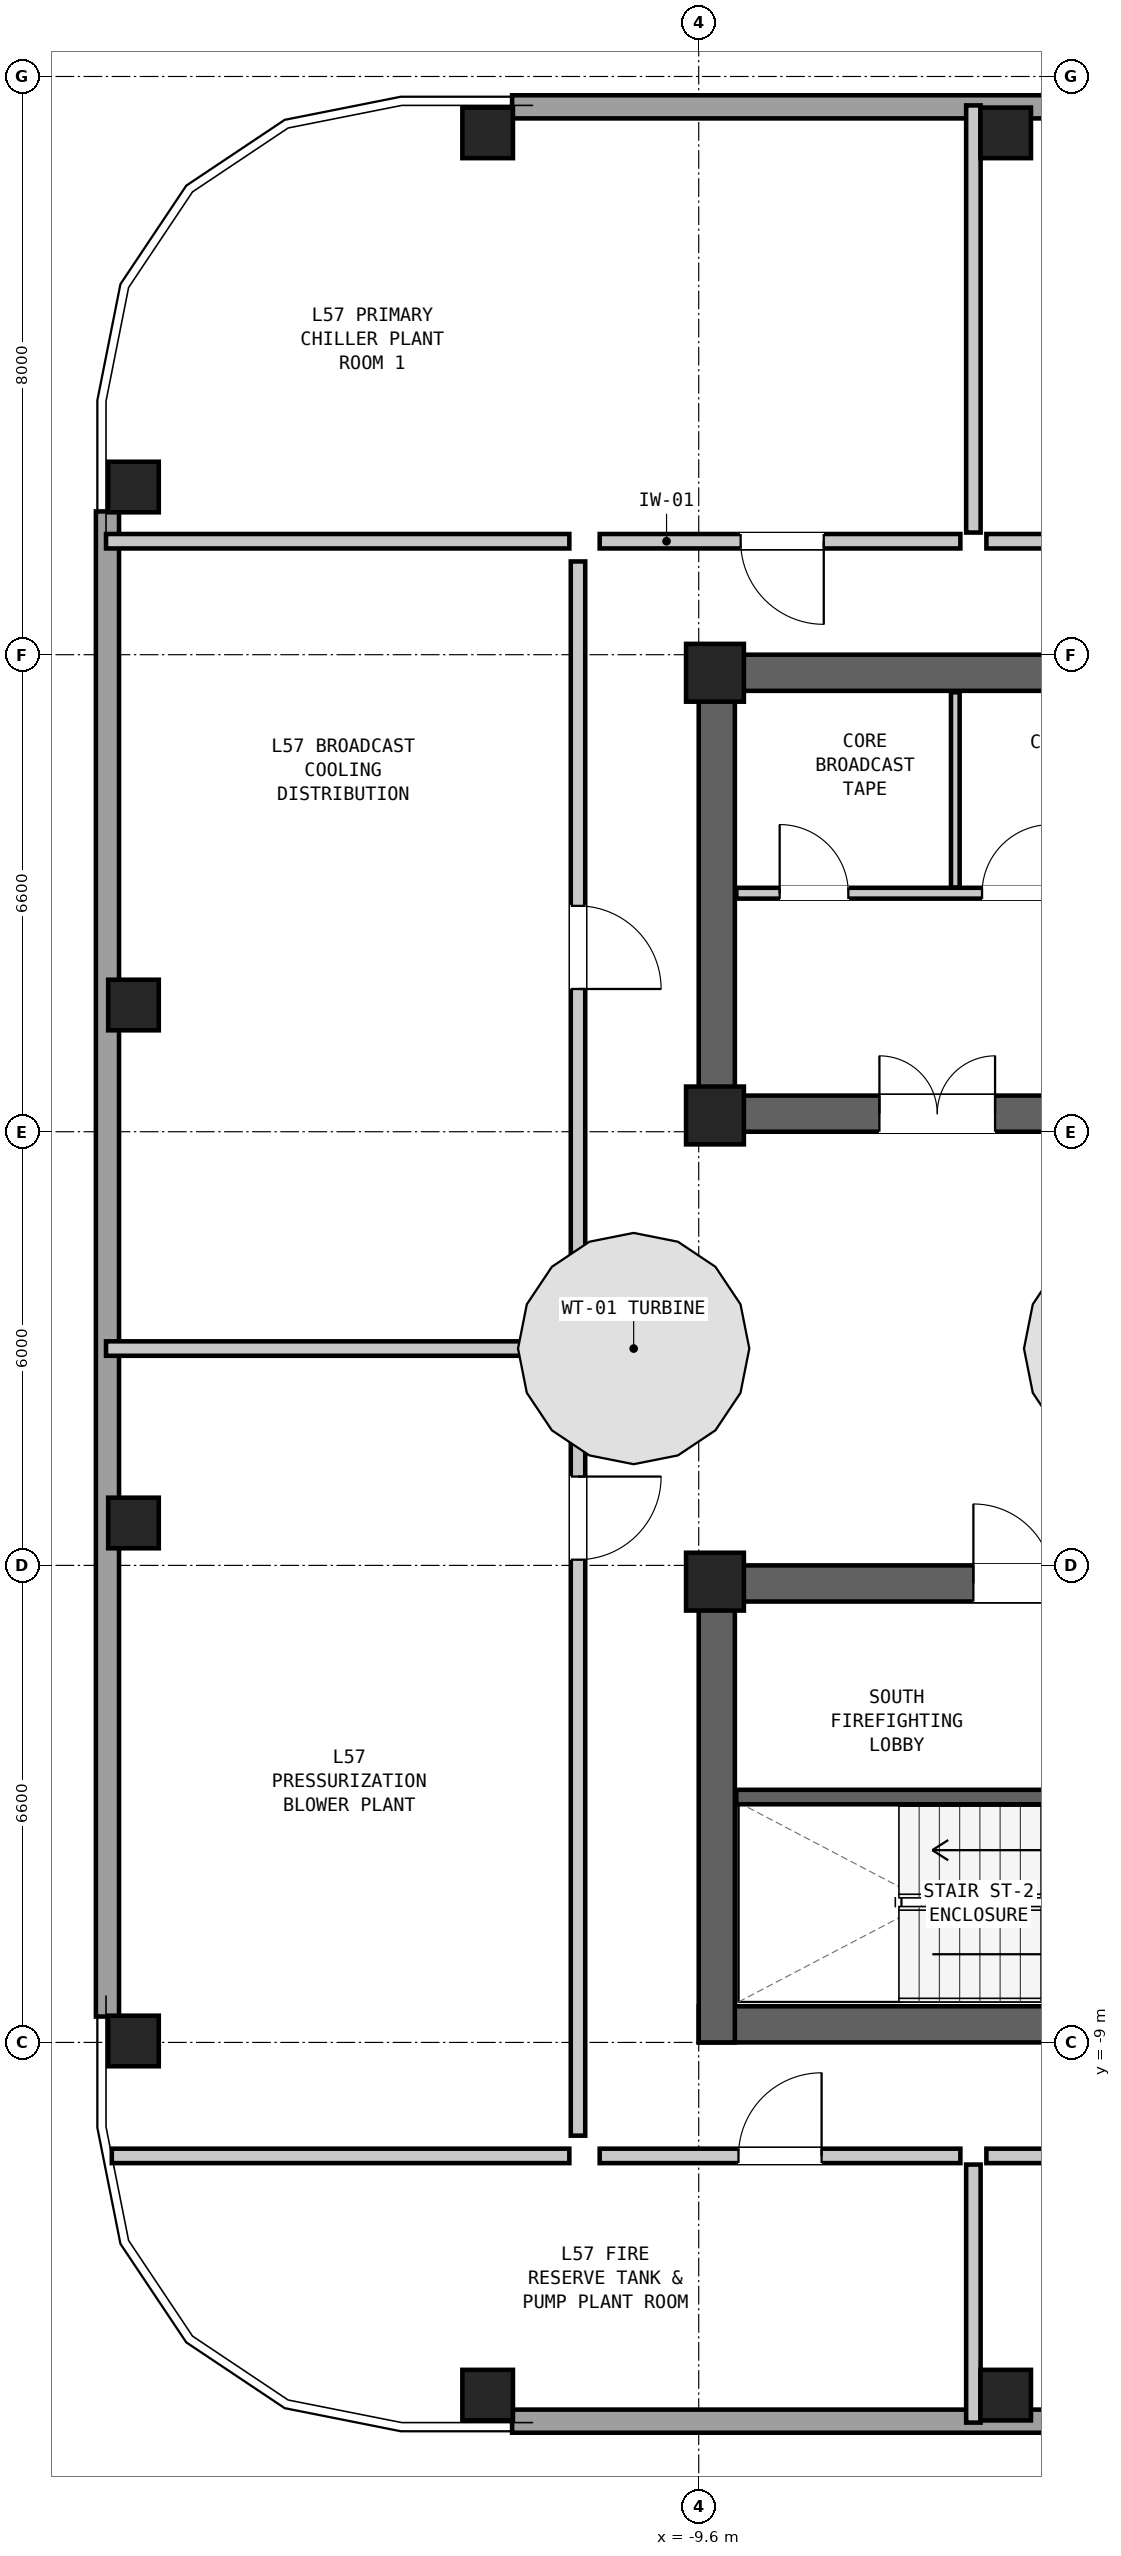
"""IFC4 building model, lengths in metres.
Left out: names, types, materials, properties, quantities, classifications, styles, units other than length and angle.
Written with IfcOpenShell. Run it as: python <this file> out.ifc"""

import sys

from ifc_helpers import new_model, si_unit, direction, frame, frame_2d, origin, origin_2d, place, context, subcontext, project, spatial, rectangle, hollow_rectangle, extrude, element, fill, save


model = new_model("IFC4")
c1 = context("Model", 3, precision=1e-05, world=origin(), true_north=direction((0.0, 1.0)))
c2 = subcontext(c1, "Body", "Model", "MODEL_VIEW")
j1 = project(units=[si_unit("LENGTHUNIT", "METRE"), si_unit("PLANEANGLEUNIT", "RADIAN")], contexts=[c1])
p1 = place(None, origin())
s1 = spatial("IfcSite", under=j1, at=p1, CompositionType="ELEMENT")
p2 = place(p1, origin())
s2 = spatial("IfcBuilding", under=s1, at=p2, CompositionType="ELEMENT")
p3 = place(p2, frame((0.0, 0.0, 195.15)))
s3 = spatial("IfcBuildingStorey", under=s2, at=p3, CompositionType="ELEMENT", Elevation=195.15)
p4 = place(p3, frame((-9.6, 9.95, 0.0), z_axis=(0.0, 0.0, 1.0), x_axis=(1.0, 0.0, 0.0)))
e1 = element("IfcWall", 1, at=p4, inside=s3, PredefinedType="SHEAR", context=c2, shape_type="SweptSolid", body=[
    extrude(rectangle(XDim=19.2, YDim=0.5, at=frame_2d((9.6, 0.0))), origin(), (0.0, 0.0, 1.0), 4.35),
])
p5 = place(p3, frame((-9.6, 3.85, 0.0), z_axis=(0.0, 0.0, 1.0), x_axis=(1.0, 0.0, 0.0)))
e2 = element("IfcWall", 2, at=p5, inside=s3, PredefinedType="SHEAR", context=c2, shape_type="SweptSolid", body=[
    extrude(rectangle(XDim=19.2, YDim=0.5, at=frame_2d((9.6, 0.0))), origin(), (0.0, 0.0, 1.0), 4.35),
])
p6 = place(p5, frame((14.2, 0.0, 0.0)))
e3 = element("IfcOpeningElement", 3, at=p6, cuts=e2, PredefinedType="OPENING", context=c2, shape_type="SweptSolid", body=[
    extrude(rectangle(XDim=1.1, YDim=2.08, at=frame_2d((0.55, 1.04))), frame((0.0, 0.262, 0.0), z_axis=(0.0, -1.0, 0.0), x_axis=(1.0, 0.0, 0.0)), (0.0, 0.0, 1.0), 0.524),
])
p7 = place(p5, frame((8.2, 0.0, 0.0)))
e4 = element("IfcOpeningElement", 4, at=p7, cuts=e2, PredefinedType="OPENING", context=c2, shape_type="SweptSolid", body=[
    extrude(rectangle(XDim=1.15, YDim=2.1, at=frame_2d((0.575, 1.05))), frame((0.0, 0.262, 0.0), z_axis=(0.0, -1.0, 0.0), x_axis=(1.0, 0.0, 0.0)), (0.0, 0.0, 1.0), 0.524),
])
p8 = place(p5, frame((2.5, 0.0, 0.0)))
e5 = element("IfcOpeningElement", 5, at=p8, cuts=e2, PredefinedType="OPENING", context=c2, shape_type="SweptSolid", body=[
    extrude(rectangle(XDim=1.6, YDim=2.12, at=frame_2d((0.8, 1.06))), frame((0.0, 0.262, 0.0), z_axis=(0.0, -1.0, 0.0), x_axis=(1.0, 0.0, 0.0)), (0.0, 0.0, 1.0), 0.524),
])
p9 = place(p3, frame((-9.35, 3.6, 0.0), z_axis=(0.0, 0.0, 1.0), x_axis=(0.0, 1.0, 0.0)))
e6 = element("IfcWall", 6, at=p9, inside=s3, PredefinedType="SHEAR", context=c2, shape_type="SweptSolid", body=[
    extrude(rectangle(XDim=6.6, YDim=0.5, at=frame_2d((3.3, 0.0))), origin(), (0.0, 0.0, 1.0), 4.35),
])
p10 = place(p3, frame((-9.6, -8.75, 0.0), z_axis=(0.0, 0.0, 1.0), x_axis=(1.0, 0.0, 0.0)))
e7 = element("IfcWall", 7, at=p10, inside=s3, PredefinedType="SHEAR", context=c2, shape_type="SweptSolid", body=[
    extrude(rectangle(XDim=19.2, YDim=0.5, at=frame_2d((9.6, 0.0))), origin(), (0.0, 0.0, 1.0), 4.35),
])
p11 = place(p3, frame((-9.6, -2.65, 0.0), z_axis=(0.0, 0.0, 1.0), x_axis=(1.0, 0.0, 0.0)))
e8 = element("IfcWall", 8, at=p11, inside=s3, PredefinedType="SHEAR", context=c2, shape_type="SweptSolid", body=[
    extrude(rectangle(XDim=19.2, YDim=0.5, at=frame_2d((9.6, 0.0))), origin(), (0.0, 0.0, 1.0), 4.35),
])
p12 = place(p11, frame((3.8, 0.0, 0.0)))
e9 = element("IfcOpeningElement", 9, at=p12, cuts=e8, PredefinedType="OPENING", context=c2, shape_type="SweptSolid", body=[
    extrude(rectangle(XDim=1.1, YDim=2.08, at=frame_2d((0.55, 1.04))), frame((0.0, 0.262, 0.0), z_axis=(0.0, -1.0, 0.0), x_axis=(1.0, 0.0, 0.0)), (0.0, 0.0, 1.0), 0.524),
])
p13 = place(p11, frame((10.15, 0.0, 0.0)))
e10 = element("IfcOpeningElement", 10, at=p13, cuts=e8, PredefinedType="OPENING", context=c2, shape_type="SweptSolid", body=[
    extrude(rectangle(XDim=0.9, YDim=2.05, at=frame_2d((0.45, 1.025))), frame((0.0, 0.262, 0.0), z_axis=(0.0, -1.0, 0.0), x_axis=(1.0, 0.0, 0.0)), (0.0, 0.0, 1.0), 0.524),
])
p14 = place(p11, frame((12.1, 0.0, 0.0)))
e11 = element("IfcOpeningElement", 11, at=p14, cuts=e8, PredefinedType="OPENING", context=c2, shape_type="SweptSolid", body=[
    extrude(rectangle(XDim=0.95, YDim=2.1, at=frame_2d((0.475, 1.05))), frame((0.0, 0.262, 0.0), z_axis=(0.0, -1.0, 0.0), x_axis=(1.0, 0.0, 0.0)), (0.0, 0.0, 1.0), 0.524),
])
p15 = place(p11, frame((14.8, 0.0, 0.0)))
e12 = element("IfcOpeningElement", 12, at=p15, cuts=e8, PredefinedType="OPENING", context=c2, shape_type="SweptSolid", body=[
    extrude(rectangle(XDim=1.6, YDim=2.12, at=frame_2d((0.8, 1.06))), frame((0.0, 0.262, 0.0), z_axis=(0.0, -1.0, 0.0), x_axis=(1.0, 0.0, 0.0)), (0.0, 0.0, 1.0), 0.524),
])
p16 = place(p3, frame((-9.35, -9.0, 0.0), z_axis=(0.0, 0.0, 1.0), x_axis=(0.0, 1.0, 0.0)))
e13 = element("IfcWall", 13, at=p16, inside=s3, PredefinedType="SHEAR", context=c2, shape_type="SweptSolid", body=[
    extrude(rectangle(XDim=6.6, YDim=0.5, at=frame_2d((3.3, 0.0))), origin(), (0.0, 0.0, 1.0), 4.35),
])
for number, where, z_axis, x_axis in (
    (14, (-12.52, -13.88, 0.0), (0.0, 0.0, 1.0), (1.0, 0.0, 0.0)),
    (15, (-5.353, -13.88, 0.0), (0.0, 0.0, 1.0), (1.0, 0.0, 0.0)),
    (16, (-5.353, 17.42, 0.0), (0.0, 0.0, 1.0), (1.0, 0.0, 0.0)),
    (17, (-12.52, 17.42, 0.0), (0.0, 0.0, 1.0), (1.0, 0.0, 0.0)),
    (18, (-17.42, 12.52, 0.0), (0.0, 0.0, 1.0), (0.0, 1.0, 0.0)),
    (19, (-17.42, 5.353, 0.0), (0.0, 0.0, 1.0), (0.0, 1.0, 0.0)),
    (20, (-17.42, -1.813, 0.0), (0.0, 0.0, 1.0), (0.0, 1.0, 0.0)),
    (21, (-17.42, -8.98, 0.0), (0.0, 0.0, 1.0), (0.0, 1.0, 0.0)),
):
    element("IfcColumn", number, at=place(p3, frame(where, z_axis=z_axis, x_axis=x_axis)), inside=s3, PredefinedType="COLUMN", context=c2, shape_type="SweptSolid", body=[
        extrude(hollow_rectangle(XDim=0.7, YDim=0.7, WallThickness=0.045, at=origin_2d()), origin(), (0.0, 0.0, 1.0), 4.35),
    ])
for number, where, z_axis, x_axis in (
    (22, (-9.375, 9.95, 0.0), (0.0, 0.0, 1.0), (1.0, 0.0, 0.0)),
    (23, (-9.375, 3.825, 0.0), (0.0, 0.0, 1.0), (1.0, 0.0, 0.0)),
    (24, (-9.375, -2.625, 0.0), (0.0, 0.0, 1.0), (1.0, 0.0, 0.0)),
):
    element("IfcColumn", number, at=place(p3, frame(where, z_axis=z_axis, x_axis=x_axis)), inside=s3, PredefinedType="COLUMN", context=c2, shape_type="SweptSolid", body=[
        extrude(rectangle(XDim=0.8, YDim=0.8, at=origin_2d()), origin(), (0.0, 0.0, 1.0), 4.35),
    ])
for number, where, z_axis, x_axis in (
    (25, (8.642, -14.24, 0.0), (0.0, 0.0, 1.0), (-1.0, 0.0, 0.0)),
    (26, (-12.182, 17.78, 0.0), (0.0, 0.0, 1.0), (1.0, 0.0, 0.0)),
    (27, (-17.78, -8.642, 0.0), (0.0, 0.0, 1.0), (0.0, 1.0, 0.0)),
):
    element("IfcWall", number, at=place(p3, frame(where, z_axis=z_axis, x_axis=x_axis)), inside=s3, PredefinedType="SOLIDWALL", context=c2, shape_type="SweptSolid", body=[
        extrude(rectangle(XDim=20.824, YDim=0.32, at=frame_2d((10.412, 0.0))), origin(), (0.0, 0.0, 1.0), 2.34),
    ])
p17 = place(p3, frame((-9.08, 6.9, 0.0), z_axis=(0.0, 0.0, 1.0), x_axis=(1.0, 0.0, 0.0)))
e28 = element("IfcWall", 28, at=p17, inside=s3, PredefinedType="PARTITIONING", context=c2, shape_type="SweptSolid", body=[
    extrude(rectangle(XDim=5.96, YDim=0.15, at=frame_2d((2.98, 0.0))), origin(), (0.0, 0.0, 1.0), 4.16),
])
p18 = place(p17, frame((0.6, 0.0, 0.0)))
e29 = element("IfcOpeningElement", 29, at=p18, cuts=e28, PredefinedType="OPENING", context=c2, shape_type="SweptSolid", body=[
    extrude(rectangle(XDim=0.95, YDim=2.1, at=frame_2d((0.475, 1.05))), frame((0.0, 0.087, 0.0), z_axis=(0.0, -1.0, 0.0), x_axis=(1.0, 0.0, 0.0)), (0.0, 0.0, 1.0), 0.174),
])
p19 = place(p17, frame((3.4, 0.0, 0.0)))
e30 = element("IfcOpeningElement", 30, at=p19, cuts=e28, PredefinedType="OPENING", context=c2, shape_type="SweptSolid", body=[
    extrude(rectangle(XDim=0.95, YDim=2.1, at=frame_2d((0.475, 1.05))), frame((0.0, 0.087, 0.0), z_axis=(0.0, -1.0, 0.0), x_axis=(1.0, 0.0, 0.0)), (0.0, 0.0, 1.0), 0.174),
])
p20 = place(p3, frame((-6.05, 6.98, 0.0), z_axis=(0.0, 0.0, 1.0), x_axis=(0.0, 1.0, 0.0)))
e31 = element("IfcWall", 31, at=p20, inside=s3, PredefinedType="PARTITIONING", context=c2, shape_type="SweptSolid", body=[
    extrude(rectangle(XDim=2.7, YDim=0.12, at=frame_2d((1.35, 0.0))), origin(), (0.0, 0.0, 1.0), 4.16),
])
p21 = place(p3, frame((-9.08, -5.605, 0.0), z_axis=(0.0, 0.0, 1.0), x_axis=(1.0, 0.0, 0.0)))
e32 = element("IfcWall", 32, at=p21, inside=s3, PredefinedType="SHEAR", context=c2, shape_type="SweptSolid", body=[
    extrude(rectangle(XDim=6.72, YDim=0.2, at=frame_2d((3.36, 0.0))), origin(), (0.0, 0.0, 1.0), 4.16),
])
p22 = place(p21, frame((5.45, 0.0, 0.0)))
e33 = element("IfcOpeningElement", 33, at=p22, cuts=e32, PredefinedType="OPENING", context=c2, shape_type="SweptSolid", body=[
    extrude(rectangle(XDim=1.05, YDim=2.08, at=frame_2d((0.525, 1.04))), frame((0.0, 0.112, 0.0), z_axis=(0.0, -1.0, 0.0), x_axis=(1.0, 0.0, 0.0)), (0.0, 0.0, 1.0), 0.224),
])
p23 = place(p3, frame((-5.98, 11.77, 0.0), z_axis=(0.0, 0.0, 1.0), x_axis=(-1.0, 0.0, 0.0)))
e34 = element("IfcWall", 34, at=p23, inside=s3, PredefinedType="PARTITIONING", context=c2, shape_type="SweptSolid", body=[
    extrude(rectangle(XDim=4.99, YDim=0.2, at=frame_2d((2.495, 0.0))), origin(), (0.0, 0.0, 1.0), 4.16),
])
p24 = place(p23, frame((1.89, 0.0, 0.0)))
e35 = element("IfcOpeningElement", 35, at=p24, cuts=e34, PredefinedType="OPENING", context=c2, shape_type="SweptSolid", body=[
    extrude(rectangle(XDim=1.15, YDim=2.1, at=frame_2d((0.575, 1.05))), frame((0.0, 0.112, 0.0), z_axis=(0.0, -1.0, 0.0), x_axis=(1.0, 0.0, 0.0)), (0.0, 0.0, 1.0), 0.224),
])
p25 = place(p3, frame((-5.8, 11.89, 0.0), z_axis=(0.0, 0.0, 1.0), x_axis=(0.0, 1.0, 0.0)))
e36 = element("IfcWall", 36, at=p25, inside=s3, PredefinedType="PARTITIONING", context=c2, shape_type="SweptSolid", body=[
    extrude(rectangle(XDim=5.91, YDim=0.2, at=frame_2d((2.955, 0.0))), origin(), (0.0, 0.0, 1.0), 3.681),
])
p26 = place(p3, frame((-0.53, 11.77, 0.0), z_axis=(0.0, 0.0, 1.0), x_axis=(-1.0, 0.0, 0.0)))
e37 = element("IfcWall", 37, at=p26, inside=s3, PredefinedType="PARTITIONING", context=c2, shape_type="SweptSolid", body=[
    extrude(rectangle(XDim=5.09, YDim=0.2, at=frame_2d((2.545, 0.0))), origin(), (0.0, 0.0, 1.0), 4.16),
])
p27 = place(p26, frame((1.97, 0.0, 0.0)))
e38 = element("IfcOpeningElement", 38, at=p27, cuts=e37, PredefinedType="OPENING", context=c2, shape_type="SweptSolid", body=[
    extrude(rectangle(XDim=1.15, YDim=2.1, at=frame_2d((0.575, 1.05))), frame((0.0, 0.112, 0.0), z_axis=(0.0, -1.0, 0.0), x_axis=(1.0, 0.0, 0.0)), (0.0, 0.0, 1.0), 0.224),
])
p28 = place(p3, frame((-10.97, -10.57, 0.0), z_axis=(0.0, 0.0, 1.0), x_axis=(1.0, 0.0, 0.0)))
e39 = element("IfcWall", 39, at=p28, inside=s3, PredefinedType="PARTITIONING", context=c2, shape_type="SweptSolid", body=[
    extrude(rectangle(XDim=4.99, YDim=0.2, at=frame_2d((2.495, 0.0))), origin(), (0.0, 0.0, 1.0), 4.16),
])
p29 = place(p28, frame((1.92, 0.0, 0.0)))
e40 = element("IfcOpeningElement", 40, at=p29, cuts=e39, PredefinedType="OPENING", context=c2, shape_type="SweptSolid", body=[
    extrude(rectangle(XDim=1.15, YDim=2.1, at=frame_2d((0.575, 1.05))), frame((0.0, 0.112, 0.0), z_axis=(0.0, -1.0, 0.0), x_axis=(1.0, 0.0, 0.0)), (0.0, 0.0, 1.0), 0.224),
])
p30 = place(p3, frame((-5.8, -14.26, 0.0), z_axis=(0.0, 0.0, 1.0), x_axis=(0.0, 1.0, 0.0)))
e41 = element("IfcWall", 41, at=p30, inside=s3, PredefinedType="PARTITIONING", context=c2, shape_type="SweptSolid", body=[
    extrude(rectangle(XDim=3.57, YDim=0.2, at=frame_2d((1.785, 0.0))), origin(), (0.0, 0.0, 1.0), 3.681),
])
p31 = place(p3, frame((-5.62, -10.57, 0.0), z_axis=(0.0, 0.0, 1.0), x_axis=(1.0, 0.0, 0.0)))
e42 = element("IfcWall", 42, at=p31, inside=s3, PredefinedType="PARTITIONING", context=c2, shape_type="SweptSolid", body=[
    extrude(rectangle(XDim=5.09, YDim=0.2, at=frame_2d((2.545, 0.0))), origin(), (0.0, 0.0, 1.0), 4.16),
])
p32 = place(p31, frame((1.99, 0.0, 0.0)))
e43 = element("IfcOpeningElement", 43, at=p32, cuts=e42, PredefinedType="OPENING", context=c2, shape_type="SweptSolid", body=[
    extrude(rectangle(XDim=1.15, YDim=2.1, at=frame_2d((0.575, 1.05))), frame((0.0, 0.112, 0.0), z_axis=(0.0, -1.0, 0.0), x_axis=(1.0, 0.0, 0.0)), (0.0, 0.0, 1.0), 0.224),
])
p33 = place(p3, frame((-17.8, 11.77, 0.0), z_axis=(0.0, 0.0, 1.0), x_axis=(1.0, 0.0, 0.0)))
e44 = element("IfcWall", 44, at=p33, inside=s3, PredefinedType="PARTITIONING", context=c2, shape_type="SweptSolid", body=[
    extrude(rectangle(XDim=6.41, YDim=0.2, at=frame_2d((3.205, 0.0))), origin(), (0.0, 0.0, 1.0), 4.16),
])
p34 = place(p3, frame((-17.72, -10.57, 0.0), z_axis=(0.0, 0.0, 1.0), x_axis=(1.0, 0.0, 0.0)))
e45 = element("IfcWall", 45, at=p34, inside=s3, PredefinedType="PARTITIONING", context=c2, shape_type="SweptSolid", body=[
    extrude(rectangle(XDim=6.33, YDim=0.2, at=frame_2d((3.165, 0.0))), origin(), (0.0, 0.0, 1.0), 4.16),
])
p35 = place(p3, frame((-17.8, 0.6, 0.0), z_axis=(0.0, 0.0, 1.0), x_axis=(1.0, 0.0, 0.0)))
e46 = element("IfcWall", 46, at=p35, inside=s3, PredefinedType="PARTITIONING", context=c2, shape_type="SweptSolid", body=[
    extrude(rectangle(XDim=6.41, YDim=0.2, at=frame_2d((3.205, 0.0))), origin(), (0.0, 0.0, 1.0), 2.34),
])
p36 = place(p3, frame((-11.27, 0.39, 0.0), z_axis=(0.0, 0.0, 1.0), x_axis=(0.0, -1.0, 0.0)))
e47 = element("IfcWall", 47, at=p36, inside=s3, PredefinedType="PARTITIONING", context=c2, shape_type="SweptSolid", body=[
    extrude(rectangle(XDim=10.68, YDim=0.2, at=frame_2d((5.34, 0.0))), origin(), (0.0, 0.0, 1.0), 2.34),
])
p37 = place(p36, frame((1.561, 0.0, 0.0)))
e48 = element("IfcOpeningElement", 48, at=p37, cuts=e47, PredefinedType="OPENING", context=c2, shape_type="SweptSolid", body=[
    extrude(rectangle(XDim=1.15, YDim=2.1, at=frame_2d((0.575, 1.05))), frame((0.0, 0.112, 0.0), z_axis=(0.0, -1.0, 0.0), x_axis=(1.0, 0.0, 0.0)), (0.0, 0.0, 1.0), 0.224),
])
p38 = place(p3, frame((-11.27, 11.49, 0.0), z_axis=(0.0, 0.0, 1.0), x_axis=(0.0, -1.0, 0.0)))
e49 = element("IfcWall", 49, at=p38, inside=s3, PredefinedType="PARTITIONING", context=c2, shape_type="SweptSolid", body=[
    extrude(rectangle(XDim=10.68, YDim=0.2, at=frame_2d((5.34, 0.0))), origin(), (0.0, 0.0, 1.0), 4.16),
])
p39 = place(p38, frame((4.765, 0.0, 0.0)))
e50 = element("IfcOpeningElement", 50, at=p39, cuts=e49, PredefinedType="OPENING", context=c2, shape_type="SweptSolid", body=[
    extrude(rectangle(XDim=1.15, YDim=2.1, at=frame_2d((0.575, 1.05))), frame((0.0, 0.112, 0.0), z_axis=(0.0, -1.0, 0.0), x_axis=(1.0, 0.0, 0.0)), (0.0, 0.0, 1.0), 0.224),
])
p40 = place(p8, origin())
e51 = element("IfcDoor", 51, at=p40, inside=s3, OperationType="DOUBLE_DOOR_SINGLE_SWING", PredefinedType="DOOR", context=c2, shape_type="SweptSolid", body=[
    extrude(rectangle(XDim=1.6, YDim=2.12, at=frame_2d((0.8, 1.06))), frame((0.0, 0.025, 0.0), z_axis=(0.0, -1.0, 0.0), x_axis=(1.0, 0.0, 0.0)), (0.0, 0.0, 1.0), 0.05),
])
fill(e5, e51)
p41 = place(p18, origin())
e52 = element("IfcDoor", 52, at=p41, inside=s3, OperationType="SINGLE_SWING_LEFT", PredefinedType="DOOR", context=c2, shape_type="SweptSolid", body=[
    extrude(rectangle(XDim=0.95, YDim=2.1, at=frame_2d((0.475, 1.05))), frame((0.0, 0.025, 0.0), z_axis=(0.0, -1.0, 0.0), x_axis=(1.0, 0.0, 0.0)), (0.0, 0.0, 1.0), 0.05),
])
fill(e29, e52)
p42 = place(p19, origin())
e53 = element("IfcDoor", 53, at=p42, inside=s3, OperationType="SINGLE_SWING_RIGHT", PredefinedType="DOOR", context=c2, shape_type="SweptSolid", body=[
    extrude(rectangle(XDim=0.95, YDim=2.1, at=frame_2d((0.475, 1.05))), frame((0.0, 0.025, 0.0), z_axis=(0.0, -1.0, 0.0), x_axis=(1.0, 0.0, 0.0)), (0.0, 0.0, 1.0), 0.05),
])
fill(e30, e53)
p43 = place(p12, origin())
e54 = element("IfcDoor", 54, at=p43, inside=s3, OperationType="SINGLE_SWING_LEFT", PredefinedType="DOOR", context=c2, shape_type="SweptSolid", body=[
    extrude(rectangle(XDim=1.1, YDim=2.08, at=frame_2d((0.55, 1.04))), frame((0.0, 0.025, 0.0), z_axis=(0.0, -1.0, 0.0), x_axis=(1.0, 0.0, 0.0)), (0.0, 0.0, 1.0), 0.05),
])
fill(e9, e54)
p44 = place(p24, origin())
e55 = element("IfcDoor", 55, at=p44, inside=s3, OperationType="SINGLE_SWING_LEFT", PredefinedType="DOOR", context=c2, shape_type="SweptSolid", body=[
    extrude(rectangle(XDim=1.15, YDim=2.1, at=frame_2d((0.575, 1.05))), frame((0.0, 0.025, 0.0), z_axis=(0.0, -1.0, 0.0), x_axis=(1.0, 0.0, 0.0)), (0.0, 0.0, 1.0), 0.05),
])
fill(e35, e55)
p45 = place(p29, origin())
e56 = element("IfcDoor", 56, at=p45, inside=s3, OperationType="SINGLE_SWING_RIGHT", PredefinedType="DOOR", context=c2, shape_type="SweptSolid", body=[
    extrude(rectangle(XDim=1.15, YDim=2.1, at=frame_2d((0.575, 1.05))), frame((0.0, 0.025, 0.0), z_axis=(0.0, -1.0, 0.0), x_axis=(1.0, 0.0, 0.0)), (0.0, 0.0, 1.0), 0.05),
])
fill(e40, e56)
p46 = place(p37, origin())
e57 = element("IfcDoor", 57, at=p46, inside=s3, OperationType="SINGLE_SWING_LEFT", PredefinedType="DOOR", context=c2, shape_type="SweptSolid", body=[
    extrude(rectangle(XDim=1.15, YDim=2.1, at=frame_2d((0.575, 1.05))), frame((0.0, 0.025, 0.0), z_axis=(0.0, -1.0, 0.0), x_axis=(1.0, 0.0, 0.0)), (0.0, 0.0, 1.0), 0.05),
])
fill(e48, e57)
p47 = place(p39, origin())
e58 = element("IfcDoor", 58, at=p47, inside=s3, OperationType="SINGLE_SWING_RIGHT", PredefinedType="DOOR", context=c2, shape_type="SweptSolid", body=[
    extrude(rectangle(XDim=1.15, YDim=2.1, at=frame_2d((0.575, 1.05))), frame((0.0, 0.025, 0.0), z_axis=(0.0, -1.0, 0.0), x_axis=(1.0, 0.0, 0.0)), (0.0, 0.0, 1.0), 0.05),
])
fill(e50, e58)
save(model, sys.argv[1])
